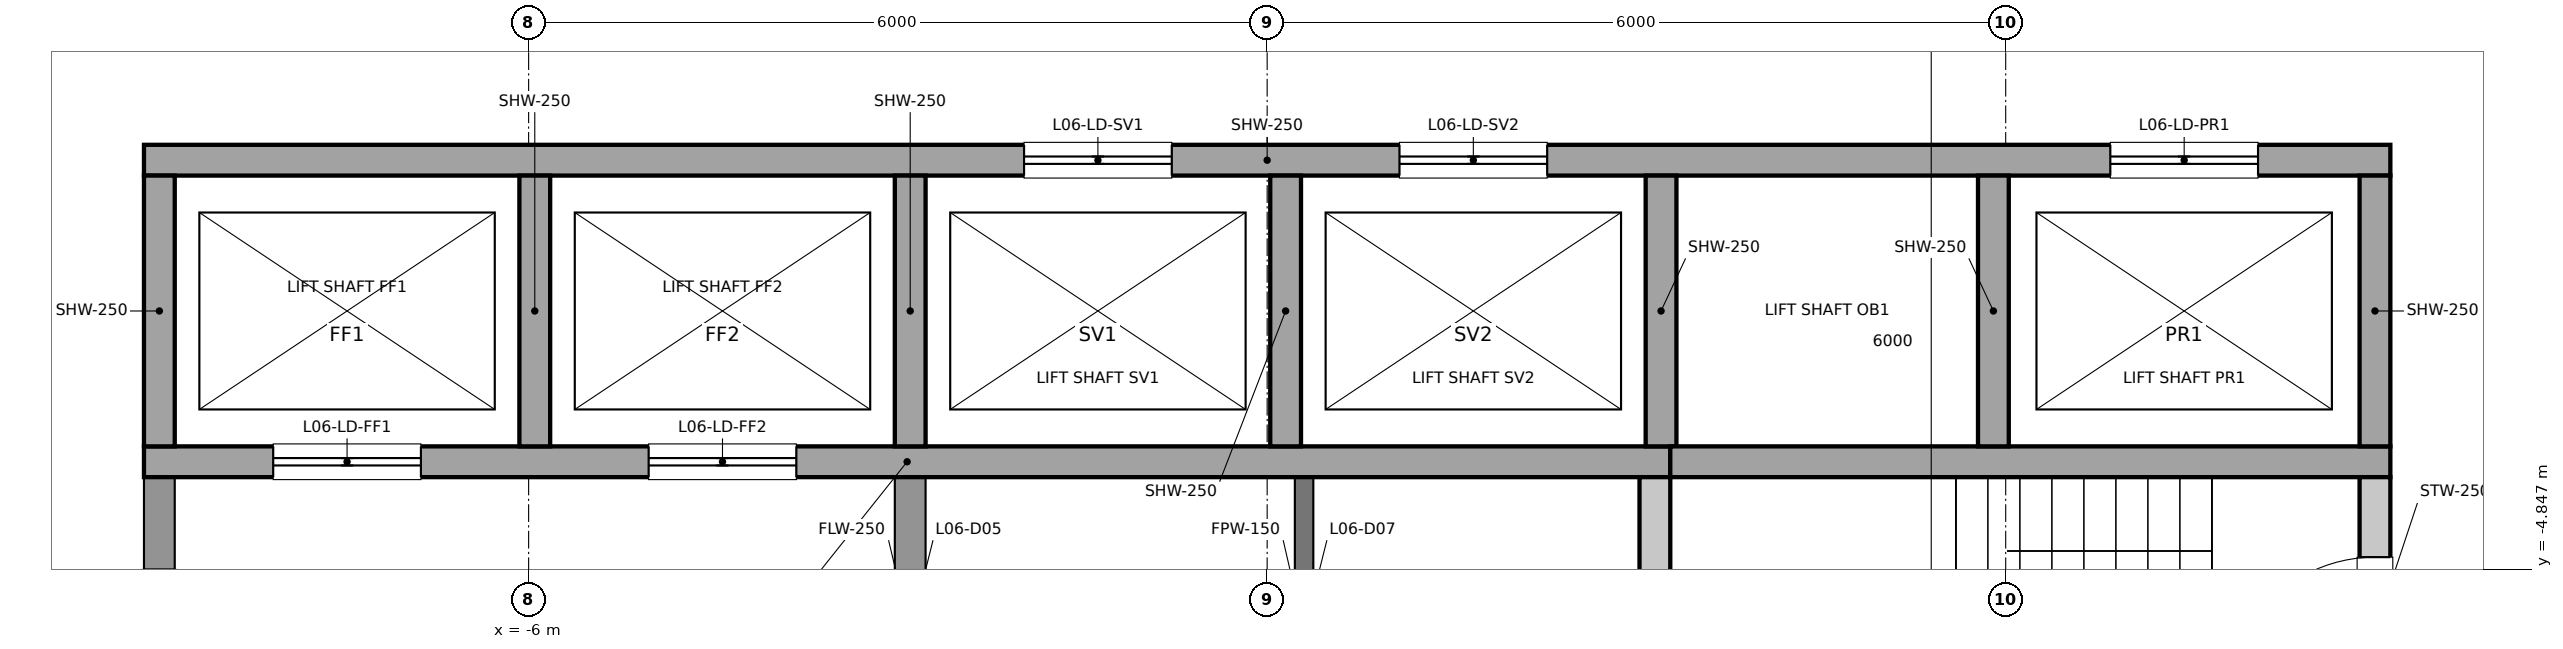
"""IFC4 building model, lengths in metres.
Left out: names, types, materials, properties, quantities, classifications, styles, units other than length and angle.
Written with IfcOpenShell. Run it as: python <this file> out.ifc"""

import sys

from ifc_helpers import new_model, si_unit, direction, frame, frame_2d, origin, place, context, subcontext, project, spatial, rectangle, extrude, element, fill, save


model = new_model("IFC4")
c1 = context("Model", 3, precision=1e-05, world=origin(), true_north=direction((0.0, 1.0)))
c2 = subcontext(c1, "Body", "Model", "MODEL_VIEW")
j1 = project(units=[si_unit("LENGTHUNIT", "METRE"), si_unit("PLANEANGLEUNIT", "RADIAN")], contexts=[c1])
p1 = place(None, origin())
s1 = spatial("IfcSite", under=j1, at=p1, CompositionType="ELEMENT")
p2 = place(p1, origin())
s2 = spatial("IfcBuilding", under=s1, at=p2, CompositionType="ELEMENT")
p3 = place(p2, frame((0.0, 0.0, 44.0)))
s3 = spatial("IfcBuildingStorey", under=s2, at=p3, CompositionType="ELEMENT", Elevation=44.0)
p4 = place(p3, frame((0.3, -6.6, 0.0), z_axis=(0.0, 0.0, 1.0), x_axis=(0.0, 1.0, 0.0)))
e1 = element("IfcWall", 1, at=p4, inside=s3, PredefinedType="PARTITIONING", context=c2, shape_type="SweptSolid", body=[
    extrude(rectangle(XDim=2.5, YDim=0.15, at=frame_2d((1.25, 0.0))), origin(), (0.0, 0.0, 1.0), 6.25),
])
p5 = place(p4, frame((0.8, 0.0, 0.0)))
e2 = element("IfcOpeningElement", 2, at=p5, cuts=e1, PredefinedType="OPENING", context=c2, shape_type="SweptSolid", body=[
    extrude(rectangle(XDim=0.9, YDim=2.1, at=frame_2d((0.45, 1.05))), frame((0.0, 0.075, 0.0), z_axis=(0.0, -1.0, 0.0), x_axis=(1.0, 0.0, 0.0)), (0.0, 0.0, 1.0), 0.15),
])
p6 = place(p3, frame((9.0, -6.6, 0.0), z_axis=(0.0, 0.0, 1.0), x_axis=(0.0, 1.0, 0.0)))
e3 = element("IfcWall", 3, at=p6, inside=s3, PredefinedType="SOLIDWALL", context=c2, shape_type="SweptSolid", body=[
    extrude(rectangle(XDim=2.5, YDim=0.25, at=frame_2d((1.25, 0.0))), origin(), (0.0, 0.0, 1.0), 6.25),
])
p7 = place(p6, frame((0.65, 0.0, 0.0)))
e4 = element("IfcOpeningElement", 4, at=p7, cuts=e3, PredefinedType="OPENING", context=c2, shape_type="SweptSolid", body=[
    extrude(rectangle(XDim=1.2, YDim=2.1, at=frame_2d((0.6, 1.05))), frame((0.0, 0.125, 0.0), z_axis=(0.0, -1.0, 0.0), x_axis=(1.0, 0.0, 0.0)), (0.0, 0.0, 1.0), 0.25),
])
p8 = place(p3, frame((-9.0, -6.6, 0.0), z_axis=(0.0, 0.0, 1.0), x_axis=(0.0, 1.0, 0.0)))
e5 = element("IfcWall", 5, at=p8, inside=s3, PredefinedType="PARTITIONING", context=c2, shape_type="SweptSolid", body=[
    extrude(rectangle(XDim=2.5, YDim=0.25, at=frame_2d((1.25, 0.0))), origin(), (0.0, 0.0, 1.0), 6.25),
])
p9 = place(p8, frame((0.75, 0.0, 0.0)))
e6 = element("IfcOpeningElement", 6, at=p9, cuts=e5, PredefinedType="OPENING", context=c2, shape_type="SweptSolid", body=[
    extrude(rectangle(XDim=1.0, YDim=2.1, at=frame_2d((0.5, 1.05))), frame((0.0, 0.125, 0.0), z_axis=(0.0, -1.0, 0.0), x_axis=(1.0, 0.0, 0.0)), (0.0, 0.0, 1.0), 0.25),
])
p10 = place(p3, frame((3.15, -6.6, 0.0), z_axis=(0.0, 0.0, 1.0), x_axis=(0.0, 1.0, 0.0)))
e7 = element("IfcWall", 7, at=p10, inside=s3, PredefinedType="SOLIDWALL", context=c2, shape_type="SweptSolid", body=[
    extrude(rectangle(XDim=2.5, YDim=0.25, at=frame_2d((1.25, 0.0))), origin(), (0.0, 0.0, 1.0), 6.25),
])
p11 = place(p3, frame((-2.9, -6.6, 0.0), z_axis=(0.0, 0.0, 1.0), x_axis=(0.0, 1.0, 0.0)))
e8 = element("IfcWall", 8, at=p11, inside=s3, PredefinedType="PARTITIONING", context=c2, shape_type="SweptSolid", body=[
    extrude(rectangle(XDim=2.5, YDim=0.25, at=frame_2d((1.25, 0.0))), origin(), (0.0, 0.0, 1.0), 6.25),
])
p12 = place(p11, frame((0.8, 0.0, 0.0)))
e9 = element("IfcOpeningElement", 9, at=p12, cuts=e8, PredefinedType="OPENING", context=c2, shape_type="SweptSolid", body=[
    extrude(rectangle(XDim=0.9, YDim=2.1, at=frame_2d((0.45, 1.05))), frame((0.0, 0.125, 0.0), z_axis=(0.0, -1.0, 0.0), x_axis=(1.0, 0.0, 0.0)), (0.0, 0.0, 1.0), 0.25),
])
p13 = place(p3, frame((-9.125, -1.525, 0.0), z_axis=(0.0, 0.0, 1.0), x_axis=(1.0, 0.0, 0.0)))
e10 = element("IfcWall", 10, at=p13, inside=s3, PredefinedType="SOLIDWALL", context=c2, shape_type="SweptSolid", body=[
    extrude(rectangle(XDim=18.25, YDim=0.25, at=frame_2d((9.125, 0.0))), origin(), (0.0, 0.0, 1.0), 6.25),
])
p14 = place(p13, frame((7.15, 0.0, 0.0)))
e11 = element("IfcOpeningElement", 11, at=p14, cuts=e10, PredefinedType="OPENING", context=c2, shape_type="SweptSolid", body=[
    extrude(rectangle(XDim=1.2, YDim=2.1, at=frame_2d((0.6, 1.05))), frame((0.0, 0.125, 0.0), z_axis=(0.0, -1.0, 0.0), x_axis=(1.0, 0.0, 0.0)), (0.0, 0.0, 1.0), 0.25),
])
p15 = place(p13, frame((10.2, 0.0, 0.0)))
e12 = element("IfcOpeningElement", 12, at=p15, cuts=e10, PredefinedType="OPENING", context=c2, shape_type="SweptSolid", body=[
    extrude(rectangle(XDim=1.2, YDim=2.1, at=frame_2d((0.6, 1.05))), frame((0.0, 0.125, 0.0), z_axis=(0.0, -1.0, 0.0), x_axis=(1.0, 0.0, 0.0)), (0.0, 0.0, 1.0), 0.25),
])
p16 = place(p13, frame((15.975, 0.0, 0.0)))
e13 = element("IfcOpeningElement", 13, at=p16, cuts=e10, PredefinedType="OPENING", context=c2, shape_type="SweptSolid", body=[
    extrude(rectangle(XDim=1.2, YDim=2.1, at=frame_2d((0.6, 1.05))), frame((0.0, 0.125, 0.0), z_axis=(0.0, -1.0, 0.0), x_axis=(1.0, 0.0, 0.0)), (0.0, 0.0, 1.0), 0.25),
])
p17 = place(p3, frame((-9.125, -3.975, 0.0), z_axis=(0.0, 0.0, 1.0), x_axis=(1.0, 0.0, 0.0)))
e14 = element("IfcWall", 14, at=p17, inside=s3, PredefinedType="SOLIDWALL", context=c2, shape_type="SweptSolid", body=[
    extrude(rectangle(XDim=12.4, YDim=0.25, at=frame_2d((6.2, 0.0))), origin(), (0.0, 0.0, 1.0), 6.25),
])
p18 = place(p17, frame((1.05, 0.0, 0.0)))
e15 = element("IfcOpeningElement", 15, at=p18, cuts=e14, PredefinedType="OPENING", context=c2, shape_type="SweptSolid", body=[
    extrude(rectangle(XDim=1.2, YDim=2.1, at=frame_2d((0.6, 1.05))), frame((0.0, 0.125, 0.0), z_axis=(0.0, -1.0, 0.0), x_axis=(1.0, 0.0, 0.0)), (0.0, 0.0, 1.0), 0.25),
])
p19 = place(p17, frame((4.1, 0.0, 0.0)))
e16 = element("IfcOpeningElement", 16, at=p19, cuts=e14, PredefinedType="OPENING", context=c2, shape_type="SweptSolid", body=[
    extrude(rectangle(XDim=1.2, YDim=2.1, at=frame_2d((0.6, 1.05))), frame((0.0, 0.125, 0.0), z_axis=(0.0, -1.0, 0.0), x_axis=(1.0, 0.0, 0.0)), (0.0, 0.0, 1.0), 0.25),
])
p20 = place(p3, frame((3.275, -3.975, 0.0), z_axis=(0.0, 0.0, 1.0), x_axis=(1.0, 0.0, 0.0)))
e17 = element("IfcWall", 17, at=p20, inside=s3, PredefinedType="SOLIDWALL", context=c2, shape_type="SweptSolid", body=[
    extrude(rectangle(XDim=5.85, YDim=0.25, at=frame_2d((2.925, 0.0))), origin(), (0.0, 0.0, 1.0), 6.25),
])
for number, where, z_axis, x_axis in (
    (18, (-9.0, -3.85, 0.0), (0.0, 0.0, 1.0), (0.0, 1.0, 0.0)),
    (19, (-5.95, -3.85, 0.0), (0.0, 0.0, 1.0), (0.0, 1.0, 0.0)),
    (20, (-2.9, -3.85, 0.0), (0.0, 0.0, 1.0), (0.0, 1.0, 0.0)),
    (21, (0.15, -3.85, 0.0), (0.0, 0.0, 1.0), (0.0, 1.0, 0.0)),
    (22, (3.2, -3.85, 0.0), (0.0, 0.0, 1.0), (0.0, 1.0, 0.0)),
    (23, (5.9, -3.85, 0.0), (0.0, 0.0, 1.0), (0.0, 1.0, 0.0)),
    (24, (9.0, -3.85, 0.0), (0.0, 0.0, 1.0), (0.0, 1.0, 0.0)),
):
    element("IfcWall", number, at=place(p3, frame(where, z_axis=z_axis, x_axis=x_axis)), inside=s3, PredefinedType="SOLIDWALL", context=c2, shape_type="SweptSolid", body=[
        extrude(rectangle(XDim=2.2, YDim=0.25, at=frame_2d((1.1, 0.0))), origin(), (0.0, 0.0, 1.0), 6.25),
    ])
p21 = place(p18, origin())
e25 = element("IfcDoor", 25, at=p21, inside=s3, OperationType="DOUBLE_DOOR_SLIDING", PredefinedType="DOOR", context=c2, shape_type="SweptSolid", body=[
    extrude(rectangle(XDim=1.2, YDim=2.1, at=frame_2d((0.6, 1.05))), frame((0.0, 0.025, 0.0), z_axis=(0.0, -1.0, 0.0), x_axis=(1.0, 0.0, 0.0)), (0.0, 0.0, 1.0), 0.05),
])
fill(e15, e25)
p22 = place(p19, origin())
e26 = element("IfcDoor", 26, at=p22, inside=s3, OperationType="DOUBLE_DOOR_SLIDING", PredefinedType="DOOR", context=c2, shape_type="SweptSolid", body=[
    extrude(rectangle(XDim=1.2, YDim=2.1, at=frame_2d((0.6, 1.05))), frame((0.0, 0.025, 0.0), z_axis=(0.0, -1.0, 0.0), x_axis=(1.0, 0.0, 0.0)), (0.0, 0.0, 1.0), 0.05),
])
fill(e16, e26)
p23 = place(p14, origin())
e27 = element("IfcDoor", 27, at=p23, inside=s3, OperationType="DOUBLE_DOOR_SLIDING", PredefinedType="DOOR", context=c2, shape_type="SweptSolid", body=[
    extrude(rectangle(XDim=1.2, YDim=2.1, at=frame_2d((0.6, 1.05))), frame((0.0, 0.025, 0.0), z_axis=(0.0, -1.0, 0.0), x_axis=(1.0, 0.0, 0.0)), (0.0, 0.0, 1.0), 0.05),
])
fill(e11, e27)
p24 = place(p15, origin())
e28 = element("IfcDoor", 28, at=p24, inside=s3, OperationType="DOUBLE_DOOR_SLIDING", PredefinedType="DOOR", context=c2, shape_type="SweptSolid", body=[
    extrude(rectangle(XDim=1.2, YDim=2.1, at=frame_2d((0.6, 1.05))), frame((0.0, 0.025, 0.0), z_axis=(0.0, -1.0, 0.0), x_axis=(1.0, 0.0, 0.0)), (0.0, 0.0, 1.0), 0.05),
])
fill(e12, e28)
p25 = place(p16, origin())
e29 = element("IfcDoor", 29, at=p25, inside=s3, OperationType="DOUBLE_DOOR_SLIDING", PredefinedType="DOOR", context=c2, shape_type="SweptSolid", body=[
    extrude(rectangle(XDim=1.2, YDim=2.1, at=frame_2d((0.6, 1.05))), frame((0.0, 0.025, 0.0), z_axis=(0.0, -1.0, 0.0), x_axis=(1.0, 0.0, 0.0)), (0.0, 0.0, 1.0), 0.05),
])
fill(e13, e29)
p26 = place(p7, origin())
e30 = element("IfcDoor", 30, at=p26, inside=s3, OperationType="SINGLE_SWING_LEFT", PredefinedType="DOOR", context=c2, shape_type="SweptSolid", body=[
    extrude(rectangle(XDim=1.2, YDim=2.1, at=frame_2d((0.6, 1.05))), frame((0.0, 0.025, 0.0), z_axis=(0.0, -1.0, 0.0), x_axis=(1.0, 0.0, 0.0)), (0.0, 0.0, 1.0), 0.05),
])
fill(e4, e30)
save(model, sys.argv[1])
